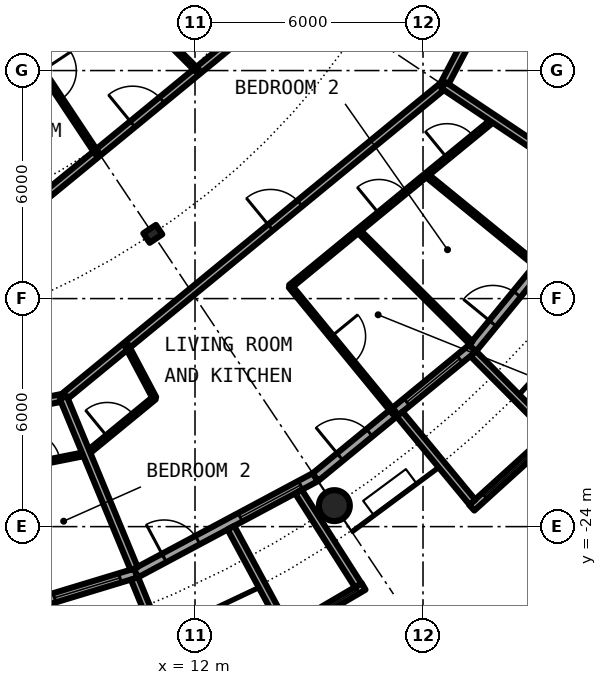
"""IFC4 building model, lengths in metres.
Left out: names, types, materials, properties, quantities, classifications, styles, units other than length and angle.
Written with IfcOpenShell. Run it as: python <this file> out.ifc"""

import sys

from ifc_helpers import new_model, si_unit, direction, frame, frame_2d, origin, origin_2d, place, context, subcontext, project, spatial, rectangle, circle, hollow_circle, i_section, extrude, element, fill, save


model = new_model("IFC4")
c1 = context("Model", 3, precision=1e-05, world=origin(), true_north=direction((0.0, 1.0)))
c2 = subcontext(c1, "Body", "Model", "MODEL_VIEW")
j1 = project(units=[si_unit("LENGTHUNIT", "METRE"), si_unit("PLANEANGLEUNIT", "RADIAN")], contexts=[c1])
p1 = place(None, origin())
s1 = spatial("IfcSite", under=j1, at=p1, CompositionType="ELEMENT")
p2 = place(p1, origin())
s2 = spatial("IfcBuilding", under=s1, at=p2, CompositionType="ELEMENT")
p3 = place(p2, frame((0.0, 0.0, 196.3)))
s3 = spatial("IfcBuildingStorey", under=s2, at=p3, CompositionType="ELEMENT", Elevation=196.3)
p4 = place(p3, frame((15.667, -23.448, 0.0), z_axis=(0.0, 0.0, 1.0), x_axis=(1.0, 0.0, 0.0)))
e1 = element("IfcColumn", 1, at=p4, inside=s3, PredefinedType="COLUMN", context=c2, shape_type="SweptSolid", body=[
    extrude(hollow_circle(Radius=0.406, WallThickness=0.03, at=origin_2d()), origin(), (0.0, 0.0, 1.0), 3.05),
])
p5 = place(p3, frame((10.889, -16.297, 0.0), z_axis=(0.0, 0.0, 1.0), x_axis=(0.55557023302, -0.831469612303, 0.0)))
e2 = element("IfcColumn", 2, at=p5, inside=s3, PredefinedType="COLUMN", context=c2, shape_type="SweptSolid", body=[
    extrude(i_section(OverallWidth=0.3, OverallDepth=0.4, WebThickness=0.013, FlangeThickness=0.024, FilletRadius=0.027, at=origin_2d()), origin(), (0.0, 0.0, 1.0), 3.05),
])
p6 = place(p3, frame((5.326, -26.775, 0.0), z_axis=(0.0, 0.0, 1.0), x_axis=(0.956965678721, 0.290201119486, 0.0)))
e3 = element("IfcWall", 3, at=p6, inside=s3, PredefinedType="SOLIDWALL", context=c2, shape_type="SweptSolid", body=[
    extrude(rectangle(XDim=5.351, YDim=0.25, at=frame_2d((2.676, 0.0))), origin(), (0.0, 0.0, 1.0), 2.7),
])
p7 = place(p6, frame((0.841, 0.0, 0.0)))
e4 = element("IfcOpeningElement", 4, at=p7, cuts=e3, PredefinedType="OPENING", context=c2, shape_type="SweptSolid", body=[
    extrude(rectangle(XDim=1.0, YDim=2.2, at=frame_2d((0.5, 1.1))), frame((0.0, 0.135, 0.0), z_axis=(0.0, -1.0, 0.0), x_axis=(1.0, 0.0, 0.0)), (0.0, 0.0, 1.0), 0.27),
])
p8 = place(p6, frame((3.111, 0.0, 0.3)))
e5 = element("IfcOpeningElement", 5, at=p8, cuts=e3, PredefinedType="OPENING", context=c2, shape_type="SweptSolid", body=[
    extrude(rectangle(XDim=1.8, YDim=2.1, at=frame_2d((0.9, 1.05))), frame((0.0, 0.135, 0.0), z_axis=(0.0, -1.0, 0.0), x_axis=(1.0, 0.0, 0.0)), (0.0, 0.0, 1.0), 0.27),
])
p9 = place(p3, frame((8.009, -26.092, -0.03), z_axis=(0.0, 0.0, 1.0), x_axis=(0.293406695073, -0.955987715029, 0.0)))
e6 = element("IfcWall", 6, at=p9, inside=s3, PredefinedType="SOLIDWALL", context=c2, shape_type="SweptSolid", body=[
    extrude(rectangle(XDim=3.006, YDim=0.2, at=frame_2d((1.503, 0.0))), origin(), (0.0, 0.0, 1.0), 2.73),
])
p10 = place(p3, frame((10.409, -25.364, -0.03), z_axis=(0.0, 0.0, 1.0), x_axis=(0.379509886562, -0.925187681501, 0.0)))
e7 = element("IfcWall", 7, at=p10, inside=s3, PredefinedType="SOLIDWALL", context=c2, shape_type="SweptSolid", body=[
    extrude(rectangle(XDim=2.883, YDim=0.2, at=frame_2d((1.441, 0.0))), origin(), (0.0, 0.0, 1.0), 2.73),
])
p11 = place(p3, frame((10.447, -25.222, 0.0), z_axis=(0.0, 0.0, 1.0), x_axis=(0.881915646801, 0.471407246368, 0.0)))
e8 = element("IfcWall", 8, at=p11, inside=s3, PredefinedType="SOLIDWALL", context=c2, shape_type="SweptSolid", body=[
    extrude(rectangle(XDim=5.352, YDim=0.25, at=frame_2d((2.676, 0.0))), origin(), (0.0, 0.0, 1.0), 2.7),
])
p12 = place(p11, frame((0.841, 0.0, 0.0)))
e9 = element("IfcOpeningElement", 9, at=p12, cuts=e8, PredefinedType="OPENING", context=c2, shape_type="SweptSolid", body=[
    extrude(rectangle(XDim=1.0, YDim=2.2, at=frame_2d((0.5, 1.1))), frame((0.0, 0.135, 0.0), z_axis=(0.0, -1.0, 0.0), x_axis=(1.0, 0.0, 0.0)), (0.0, 0.0, 1.0), 0.27),
])
p13 = place(p11, frame((3.111, 0.0, 0.3)))
e10 = element("IfcOpeningElement", 10, at=p13, cuts=e8, PredefinedType="OPENING", context=c2, shape_type="SweptSolid", body=[
    extrude(rectangle(XDim=1.8, YDim=2.1, at=frame_2d((0.9, 1.05))), frame((0.0, 0.135, 0.0), z_axis=(0.0, -1.0, 0.0), x_axis=(1.0, 0.0, 0.0)), (0.0, 0.0, 1.0), 0.27),
])
p14 = place(p3, frame((14.327, -26.812, -0.03), z_axis=(0.0, 0.0, 1.0), x_axis=(0.862403467503, 0.506221551535, 0.0)))
e11 = element("IfcWall", 11, at=p14, inside=s3, PredefinedType="SOLIDWALL", context=c2, shape_type="SweptSolid", body=[
    extrude(rectangle(XDim=2.446, YDim=0.2, at=frame_2d((1.223, 0.0))), origin(), (0.0, 0.0, 1.0), 2.73),
])
p15 = place(p14, frame((0.183, 0.0, 0.33)))
e12 = element("IfcOpeningElement", 12, at=p15, cuts=e11, PredefinedType="OPENING", context=c2, shape_type="SweptSolid", body=[
    extrude(circle(Radius=1.04, at=frame_2d((1.04, 1.04))), frame((0.0, 0.11, 0.0), z_axis=(0.0, -1.0, 0.0), x_axis=(1.0, 0.0, 0.0)), (0.0, 0.0, 1.0), 0.22),
])
p16 = place(p3, frame((12.945, -24.029, -0.03), z_axis=(0.0, 0.0, 1.0), x_axis=(0.474424310775, -0.88029629861, 0.0)))
e13 = element("IfcWall", 13, at=p16, inside=s3, PredefinedType="SOLIDWALL", context=c2, shape_type="SweptSolid", body=[
    extrude(rectangle(XDim=3.006, YDim=0.2, at=frame_2d((1.503, 0.0))), origin(), (0.0, 0.0, 1.0), 2.73),
])
p17 = place(p3, frame((14.722, -23.079, -0.03), z_axis=(0.0, 0.0, 1.0), x_axis=(0.537572179146, -0.843217737129, 0.0)))
e14 = element("IfcWall", 14, at=p17, inside=s3, PredefinedType="SOLIDWALL", context=c2, shape_type="SweptSolid", body=[
    extrude(rectangle(XDim=2.924, YDim=0.2, at=frame_2d((1.462, 0.0))), origin(), (0.0, 0.0, 1.0), 2.73),
])
p18 = place(p3, frame((15.167, -22.699, 0.0), z_axis=(0.0, 0.0, 1.0), x_axis=(0.773019449054, 0.634382322723, 0.0)))
e15 = element("IfcWall", 15, at=p18, inside=s3, PredefinedType="SOLIDWALL", context=c2, shape_type="SweptSolid", body=[
    extrude(rectangle(XDim=5.352, YDim=0.25, at=frame_2d((2.676, 0.0))), origin(), (0.0, 0.0, 1.0), 2.7),
])
p19 = place(p18, frame((0.841, 0.0, 0.0)))
e16 = element("IfcOpeningElement", 16, at=p19, cuts=e15, PredefinedType="OPENING", context=c2, shape_type="SweptSolid", body=[
    extrude(rectangle(XDim=1.0, YDim=2.2, at=frame_2d((0.5, 1.1))), frame((0.0, 0.135, 0.0), z_axis=(0.0, -1.0, 0.0), x_axis=(1.0, 0.0, 0.0)), (0.0, 0.0, 1.0), 0.27),
])
p20 = place(p18, frame((3.111, 0.0, 0.3)))
e17 = element("IfcOpeningElement", 17, at=p20, cuts=e15, PredefinedType="OPENING", context=c2, shape_type="SweptSolid", body=[
    extrude(rectangle(XDim=1.8, YDim=2.1, at=frame_2d((0.9, 1.05))), frame((0.0, 0.135, 0.0), z_axis=(0.0, -1.0, 0.0), x_axis=(1.0, 0.0, 0.0)), (0.0, 0.0, 1.0), 0.27),
])
p21 = place(p3, frame((19.282, -23.503, -0.03), z_axis=(0.0, 0.0, 1.0), x_axis=(0.740998365753, 0.671506829416, 0.0)))
e18 = element("IfcWall", 18, at=p21, inside=s3, PredefinedType="SOLIDWALL", context=c2, shape_type="SweptSolid", body=[
    extrude(rectangle(XDim=2.993, YDim=0.2, at=frame_2d((1.497, 0.0))), origin(), (0.0, 0.0, 1.0), 2.73),
])
p22 = place(p21, frame((0.457, 0.0, 0.33)))
e19 = element("IfcOpeningElement", 19, at=p22, cuts=e18, PredefinedType="OPENING", context=c2, shape_type="SweptSolid", body=[
    extrude(circle(Radius=1.04, at=frame_2d((1.04, 1.04))), frame((0.0, 0.11, 0.0), z_axis=(0.0, -1.0, 0.0), x_axis=(1.0, 0.0, 0.0)), (0.0, 0.0, 1.0), 0.22),
])
p23 = place(p3, frame((17.384, -21.041, -0.03), z_axis=(0.0, 0.0, 1.0), x_axis=(0.63709551667, -0.770784861449, 0.0)))
e20 = element("IfcWall", 20, at=p23, inside=s3, PredefinedType="SOLIDWALL", context=c2, shape_type="SweptSolid", body=[
    extrude(rectangle(XDim=3.006, YDim=0.2, at=frame_2d((1.503, 0.0))), origin(), (0.0, 0.0, 1.0), 2.73),
])
p24 = place(p3, frame((19.323, -19.45, -0.03), z_axis=(0.0, 0.0, 1.0), x_axis=(0.704476739375, -0.709727076896, 0.0)))
e21 = element("IfcWall", 21, at=p24, inside=s3, PredefinedType="SOLIDWALL", context=c2, shape_type="SweptSolid", body=[
    extrude(rectangle(XDim=2.883, YDim=0.2, at=frame_2d((1.441, 0.0))), origin(), (0.0, 0.0, 1.0), 2.73),
])
p25 = place(p3, frame((19.304, -19.304, 0.0), z_axis=(0.0, 0.0, 1.0), x_axis=(0.634382322723, 0.773019449054, 0.0)))
e22 = element("IfcWall", 22, at=p25, inside=s3, PredefinedType="SOLIDWALL", context=c2, shape_type="SweptSolid", body=[
    extrude(rectangle(XDim=5.352, YDim=0.25, at=frame_2d((2.676, 0.0))), origin(), (0.0, 0.0, 1.0), 2.7),
])
p26 = place(p25, frame((0.841, 0.0, 0.0)))
e23 = element("IfcOpeningElement", 23, at=p26, cuts=e22, PredefinedType="OPENING", context=c2, shape_type="SweptSolid", body=[
    extrude(rectangle(XDim=1.0, YDim=2.2, at=frame_2d((0.5, 1.1))), frame((0.0, 0.135, 0.0), z_axis=(0.0, -1.0, 0.0), x_axis=(1.0, 0.0, 0.0)), (0.0, 0.0, 1.0), 0.27),
])
p27 = place(p25, frame((3.111, 0.0, 0.3)))
e24 = element("IfcOpeningElement", 24, at=p27, cuts=e22, PredefinedType="OPENING", context=c2, shape_type="SweptSolid", body=[
    extrude(rectangle(XDim=1.8, YDim=2.1, at=frame_2d((0.9, 1.05))), frame((0.0, 0.135, 0.0), z_axis=(0.0, -1.0, 0.0), x_axis=(1.0, 0.0, 0.0)), (0.0, 0.0, 1.0), 0.27),
])
p28 = place(p3, frame((4.577, -22.989, 0.0), z_axis=(0.0, 0.0, 1.0), x_axis=(0.980813600024, 0.194947895622, 0.0)))
e25 = element("IfcWall", 25, at=p28, inside=s3, PredefinedType="PARTITIONING", context=c2, shape_type="SweptSolid", body=[
    extrude(rectangle(XDim=4.662, YDim=0.1, at=frame_2d((2.331, 0.0))), origin(), (0.0, 0.0, 1.0), 2.7),
])
p29 = place(p28, frame((3.043, 0.0, 0.0)))
e26 = element("IfcOpeningElement", 26, at=p29, cuts=e25, PredefinedType="OPENING", context=c2, shape_type="SweptSolid", body=[
    extrude(rectangle(XDim=0.9, YDim=2.3, at=frame_2d((0.45, 1.15))), frame((0.0, 0.06, 0.0), z_axis=(0.0, -1.0, 0.0), x_axis=(1.0, 0.0, 0.0)), (0.0, 0.0, 1.0), 0.12),
])
p30 = place(p3, frame((9.146, -22.081, 0.0), z_axis=(0.0, 0.0, 1.0), x_axis=(0.773095932958, 0.634289112663, 0.0)))
e27 = element("IfcWall", 27, at=p30, inside=s3, PredefinedType="PARTITIONING", context=c2, shape_type="SweptSolid", body=[
    extrude(rectangle(XDim=2.313, YDim=0.1, at=frame_2d((1.156, 0.0))), origin(), (0.0, 0.0, 1.0), 2.7),
])
p31 = place(p30, frame((0.706, 0.0, 0.0)))
e28 = element("IfcOpeningElement", 28, at=p31, cuts=e27, PredefinedType="OPENING", context=c2, shape_type="SweptSolid", body=[
    extrude(rectangle(XDim=0.9, YDim=2.3, at=frame_2d((0.45, 1.15))), frame((0.0, 0.06, 0.0), z_axis=(0.0, -1.0, 0.0), x_axis=(1.0, 0.0, 0.0)), (0.0, 0.0, 1.0), 0.12),
])
p32 = place(p3, frame((14.508, -17.681, 0.0), z_axis=(0.0, 0.0, 1.0), x_axis=(0.773155647559, 0.634216323227, 0.0)))
e29 = element("IfcWall", 29, at=p32, inside=s3, PredefinedType="PARTITIONING", context=c2, shape_type="SweptSolid", body=[
    extrude(rectangle(XDim=6.939, YDim=0.1, at=frame_2d((3.469, 0.0))), origin(), (0.0, 0.0, 1.0), 2.7),
])
p33 = place(p32, frame((3.019, 0.0, 0.0)))
e30 = element("IfcOpeningElement", 30, at=p33, cuts=e29, PredefinedType="OPENING", context=c2, shape_type="SweptSolid", body=[
    extrude(rectangle(XDim=0.9, YDim=2.3, at=frame_2d((0.45, 1.15))), frame((0.0, 0.06, 0.0), z_axis=(0.0, -1.0, 0.0), x_axis=(1.0, 0.0, 0.0)), (0.0, 0.0, 1.0), 0.12),
])
p34 = place(p32, frame((5.334, 0.0, 0.0)))
e31 = element("IfcOpeningElement", 31, at=p34, cuts=e29, PredefinedType="OPENING", context=c2, shape_type="SweptSolid", body=[
    extrude(rectangle(XDim=0.9, YDim=2.3, at=frame_2d((0.45, 1.15))), frame((0.0, 0.06, 0.0), z_axis=(0.0, -1.0, 0.0), x_axis=(1.0, 0.0, 0.0)), (0.0, 0.0, 1.0), 0.12),
])
p35 = place(p3, frame((18.542, -12.389, 0.0), z_axis=(0.0, 0.0, 1.0), x_axis=(0.465359652486, 0.885121683068, 0.0)))
e32 = element("IfcWall", 32, at=p35, inside=s3, PredefinedType="PARTITIONING", context=c2, shape_type="SweptSolid", body=[
    extrude(rectangle(XDim=1.665, YDim=0.2, at=frame_2d((0.833, 0.0))), origin(), (0.0, 0.0, 1.0), 2.7),
])
p36 = place(p3, frame((0.0, -22.3, 0.0), z_axis=(0.0, 0.0, 1.0), x_axis=(0.980813117615, 0.194950322682, 0.0)))
e33 = element("IfcWall", 33, at=p36, inside=s3, PredefinedType="PARTITIONING", context=c2, shape_type="SweptSolid", body=[
    extrude(rectangle(XDim=8.7, YDim=0.2, at=frame_2d((4.35, 0.0))), origin(), (0.0, 0.0, 1.0), 2.7),
])
p37 = place(p36, frame((4.938, 0.0, 0.0)))
e34 = element("IfcOpeningElement", 34, at=p37, cuts=e33, PredefinedType="OPENING", context=c2, shape_type="SweptSolid", body=[
    extrude(rectangle(XDim=1.0, YDim=2.3, at=frame_2d((0.5, 1.15))), frame((0.0, 0.11, 0.0), z_axis=(0.0, -1.0, 0.0), x_axis=(1.0, 0.0, 0.0)), (0.0, 0.0, 1.0), 0.22),
])
p38 = place(p3, frame((8.534, -20.603, 0.0), z_axis=(0.0, 0.0, 1.0), x_axis=(0.772983503654, 0.634426121056, 0.0)))
e35 = element("IfcWall", 35, at=p38, inside=s3, PredefinedType="PARTITIONING", context=c2, shape_type="SweptSolid", body=[
    extrude(rectangle(XDim=12.947, YDim=0.2, at=frame_2d((6.474, 0.0))), origin(), (0.0, 0.0, 1.0), 2.7),
])
p39 = place(p38, frame((7.053, 0.0, 0.0)))
e36 = element("IfcOpeningElement", 36, at=p39, cuts=e35, PredefinedType="OPENING", context=c2, shape_type="SweptSolid", body=[
    extrude(rectangle(XDim=1.0, YDim=2.3, at=frame_2d((0.5, 1.15))), frame((0.0, 0.11, 0.0), z_axis=(0.0, -1.0, 0.0), x_axis=(1.0, 0.0, 0.0)), (0.0, 0.0, 1.0), 0.22),
])
p40 = place(p3, frame((6.773, -16.353, 0.0), z_axis=(0.0, 0.0, 1.0), x_axis=(0.773034536097, 0.634363938131, 0.0)))
e37 = element("IfcWall", 37, at=p40, inside=s3, PredefinedType="PARTITIONING", context=c2, shape_type="SweptSolid", body=[
    extrude(rectangle(XDim=10.277, YDim=0.2, at=frame_2d((5.138, 0.0))), origin(), (0.0, 0.0, 1.0), 2.7),
])
p41 = place(p40, frame((4.638, 0.0, 0.0)))
e38 = element("IfcOpeningElement", 38, at=p41, cuts=e37, PredefinedType="OPENING", context=c2, shape_type="SweptSolid", body=[
    extrude(rectangle(XDim=1.0, YDim=2.3, at=frame_2d((0.5, 1.15))), frame((0.0, 0.11, 0.0), z_axis=(0.0, -1.0, 0.0), x_axis=(1.0, 0.0, 0.0)), (0.0, 0.0, 1.0), 0.22),
])
p42 = place(p3, frame((7.031, -10.582, 0.0), z_axis=(0.0, 0.0, 1.0), x_axis=(0.553303732327, -0.832979579457, 0.0)))
e39 = element("IfcWall", 39, at=p42, inside=s3, PredefinedType="PARTITIONING", context=c2, shape_type="SweptSolid", body=[
    extrude(rectangle(XDim=4.319, YDim=0.1, at=frame_2d((2.16, 0.0))), origin(), (0.0, 0.0, 1.0), 2.7),
])
p43 = place(p42, frame((1.71, 0.0, 0.0)))
e40 = element("IfcOpeningElement", 40, at=p43, cuts=e39, PredefinedType="OPENING", context=c2, shape_type="SweptSolid", body=[
    extrude(rectangle(XDim=0.9, YDim=2.3, at=frame_2d((0.45, 1.15))), frame((0.0, 0.06, 0.0), z_axis=(0.0, -1.0, 0.0), x_axis=(1.0, 0.0, 0.0)), (0.0, 0.0, 1.0), 0.12),
])
p44 = place(p3, frame((8.534, -20.603, 0.0), z_axis=(0.0, 0.0, 1.0), x_axis=(0.382651153718, -0.923892902104, 0.0)))
e41 = element("IfcWall", 41, at=p44, inside=s3, PredefinedType="PARTITIONING", context=c2, shape_type="SweptSolid", body=[
    extrude(rectangle(XDim=4.874, YDim=0.2, at=frame_2d((2.437, 0.0))), origin(), (0.0, 0.0, 1.0), 2.7),
])
p45 = place(p3, frame((9.097, -9.05, 0.0), z_axis=(0.0, 0.0, 1.0), x_axis=(0.708909651863, -0.705299302067, 0.0)))
e42 = element("IfcWall", 42, at=p45, inside=s3, PredefinedType="PARTITIONING", context=c2, shape_type="SweptSolid", body=[
    extrude(rectangle(XDim=4.193, YDim=0.1, at=frame_2d((2.096, 0.0))), origin(), (0.0, 0.0, 1.0), 2.7),
])
p46 = place(p45, frame((1.646, 0.0, 0.0)))
e43 = element("IfcOpeningElement", 43, at=p46, cuts=e42, PredefinedType="OPENING", context=c2, shape_type="SweptSolid", body=[
    extrude(rectangle(XDim=0.9, YDim=2.3, at=frame_2d((0.45, 1.15))), frame((0.0, 0.06, 0.0), z_axis=(0.0, -1.0, 0.0), x_axis=(1.0, 0.0, 0.0)), (0.0, 0.0, 1.0), 0.12),
])
p47 = place(p3, frame((10.202, -19.234, 0.0), z_axis=(0.0, 0.0, 1.0), x_axis=(0.468648615763, -0.88338466986, 0.0)))
e44 = element("IfcWall", 44, at=p47, inside=s3, PredefinedType="PARTITIONING", context=c2, shape_type="SweptSolid", body=[
    extrude(rectangle(XDim=1.562, YDim=0.1, at=frame_2d((0.781, 0.0))), origin(), (0.0, 0.0, 1.0), 2.7),
])
p48 = place(p3, frame((14.509, -17.679, 0.0), z_axis=(0.0, 0.0, 1.0), x_axis=(0.634342681687, -0.77305197897, 0.0)))
e45 = element("IfcWall", 45, at=p48, inside=s3, PredefinedType="PARTITIONING", context=c2, shape_type="SweptSolid", body=[
    extrude(rectangle(XDim=4.305, YDim=0.1, at=frame_2d((2.153, 0.0))), origin(), (0.0, 0.0, 1.0), 2.7),
])
p49 = place(p48, frame((1.703, 0.0, 0.0)))
e46 = element("IfcOpeningElement", 46, at=p49, cuts=e45, PredefinedType="OPENING", context=c2, shape_type="SweptSolid", body=[
    extrude(rectangle(XDim=0.9, YDim=2.3, at=frame_2d((0.45, 1.15))), frame((0.0, 0.06, 0.0), z_axis=(0.0, -1.0, 0.0), x_axis=(1.0, 0.0, 0.0)), (0.0, 0.0, 1.0), 0.12),
])
p50 = place(p3, frame((16.296, -16.213, 0.0), z_axis=(0.0, 0.0, 1.0), x_axis=(0.708999026534, -0.705209458511, 0.0)))
e47 = element("IfcWall", 47, at=p50, inside=s3, PredefinedType="PARTITIONING", context=c2, shape_type="SweptSolid", body=[
    extrude(rectangle(XDim=4.188, YDim=0.1, at=frame_2d((2.094, 0.0))), origin(), (0.0, 0.0, 1.0), 2.7),
])
p51 = place(p3, frame((18.084, -14.745, 0.0), z_axis=(0.0, 0.0, 1.0), x_axis=(0.77495020745, -0.632022290724, 0.0)))
e48 = element("IfcWall", 48, at=p51, inside=s3, PredefinedType="PARTITIONING", context=c2, shape_type="SweptSolid", body=[
    extrude(rectangle(XDim=3.842, YDim=0.1, at=frame_2d((1.921, 0.0))), origin(), (0.0, 0.0, 1.0), 2.7),
])
p52 = place(p3, frame((18.542, -12.389, 0.0), z_axis=(0.0, 0.0, 1.0), x_axis=(0.831387096605, -0.55569370664, 0.0)))
e49 = element("IfcWall", 49, at=p52, inside=s3, PredefinedType="PARTITIONING", context=c2, shape_type="SweptSolid", body=[
    extrude(rectangle(XDim=4.875, YDim=0.2, at=frame_2d((2.438, 0.0))), origin(), (0.0, 0.0, 1.0), 2.7),
])
p53 = place(p8, origin())
e50 = element("IfcWindow", 50, at=p53, inside=s3, PartitioningType="SINGLE_PANEL", PredefinedType="WINDOW", context=c2, shape_type="SweptSolid", body=[
    extrude(rectangle(XDim=1.8, YDim=2.1, at=frame_2d((0.9, 1.05))), frame((0.0, 0.03, 0.0), z_axis=(0.0, -1.0, 0.0), x_axis=(1.0, 0.0, 0.0)), (0.0, 0.0, 1.0), 0.06),
])
fill(e5, e50)
p54 = place(p12, origin())
e51 = element("IfcDoor", 51, at=p54, inside=s3, OperationType="SINGLE_SWING_LEFT", PredefinedType="DOOR", context=c2, shape_type="SweptSolid", body=[
    extrude(rectangle(XDim=1.0, YDim=2.2, at=frame_2d((0.5, 1.1))), frame((0.0, 0.025, 0.0), z_axis=(0.0, -1.0, 0.0), x_axis=(1.0, 0.0, 0.0)), (0.0, 0.0, 1.0), 0.05),
])
fill(e9, e51)
p55 = place(p13, origin())
e52 = element("IfcWindow", 52, at=p55, inside=s3, PartitioningType="SINGLE_PANEL", PredefinedType="WINDOW", context=c2, shape_type="SweptSolid", body=[
    extrude(rectangle(XDim=1.8, YDim=2.1, at=frame_2d((0.9, 1.05))), frame((0.0, 0.03, 0.0), z_axis=(0.0, -1.0, 0.0), x_axis=(1.0, 0.0, 0.0)), (0.0, 0.0, 1.0), 0.06),
])
fill(e10, e52)
p56 = place(p15, origin())
e53 = element("IfcWindow", 53, at=p56, inside=s3, PartitioningType="SINGLE_PANEL", PredefinedType="WINDOW", context=c2, shape_type="SweptSolid", body=[
    extrude(circle(Radius=1.04, at=frame_2d((1.04, 1.04))), frame((0.0, 0.03, 0.0), z_axis=(0.0, -1.0, 0.0), x_axis=(1.0, 0.0, 0.0)), (0.0, 0.0, 1.0), 0.06),
])
fill(e12, e53)
p57 = place(p19, origin())
e54 = element("IfcDoor", 54, at=p57, inside=s3, OperationType="SINGLE_SWING_LEFT", PredefinedType="DOOR", context=c2, shape_type="SweptSolid", body=[
    extrude(rectangle(XDim=1.0, YDim=2.2, at=frame_2d((0.5, 1.1))), frame((0.0, 0.025, 0.0), z_axis=(0.0, -1.0, 0.0), x_axis=(1.0, 0.0, 0.0)), (0.0, 0.0, 1.0), 0.05),
])
fill(e16, e54)
p58 = place(p20, origin())
e55 = element("IfcWindow", 55, at=p58, inside=s3, PartitioningType="SINGLE_PANEL", PredefinedType="WINDOW", context=c2, shape_type="SweptSolid", body=[
    extrude(rectangle(XDim=1.8, YDim=2.1, at=frame_2d((0.9, 1.05))), frame((0.0, 0.03, 0.0), z_axis=(0.0, -1.0, 0.0), x_axis=(1.0, 0.0, 0.0)), (0.0, 0.0, 1.0), 0.06),
])
fill(e17, e55)
p59 = place(p22, origin())
e56 = element("IfcWindow", 56, at=p59, inside=s3, PartitioningType="SINGLE_PANEL", PredefinedType="WINDOW", context=c2, shape_type="SweptSolid", body=[
    extrude(circle(Radius=1.04, at=frame_2d((1.04, 1.04))), frame((0.0, 0.03, 0.0), z_axis=(0.0, -1.0, 0.0), x_axis=(1.0, 0.0, 0.0)), (0.0, 0.0, 1.0), 0.06),
])
fill(e19, e56)
p60 = place(p26, origin())
e57 = element("IfcDoor", 57, at=p60, inside=s3, OperationType="SINGLE_SWING_LEFT", PredefinedType="DOOR", context=c2, shape_type="SweptSolid", body=[
    extrude(rectangle(XDim=1.0, YDim=2.2, at=frame_2d((0.5, 1.1))), frame((0.0, 0.025, 0.0), z_axis=(0.0, -1.0, 0.0), x_axis=(1.0, 0.0, 0.0)), (0.0, 0.0, 1.0), 0.05),
])
fill(e23, e57)
p61 = place(p29, origin())
e58 = element("IfcDoor", 58, at=p61, inside=s3, OperationType="SINGLE_SWING_RIGHT", PredefinedType="DOOR", context=c2, shape_type="SweptSolid", body=[
    extrude(rectangle(XDim=0.9, YDim=2.3, at=frame_2d((0.45, 1.15))), frame((0.0, 0.025, 0.0), z_axis=(0.0, -1.0, 0.0), x_axis=(1.0, 0.0, 0.0)), (0.0, 0.0, 1.0), 0.05),
])
fill(e26, e58)
p62 = place(p39, origin())
e59 = element("IfcDoor", 59, at=p62, inside=s3, OperationType="SINGLE_SWING_RIGHT", PredefinedType="DOOR", context=c2, shape_type="SweptSolid", body=[
    extrude(rectangle(XDim=1.0, YDim=2.3, at=frame_2d((0.5, 1.15))), frame((0.0, 0.025, 0.0), z_axis=(0.0, -1.0, 0.0), x_axis=(1.0, 0.0, 0.0)), (0.0, 0.0, 1.0), 0.05),
])
fill(e36, e59)
p63 = place(p31, origin())
e60 = element("IfcDoor", 60, at=p63, inside=s3, OperationType="SINGLE_SWING_LEFT", PredefinedType="DOOR", context=c2, shape_type="SweptSolid", body=[
    extrude(rectangle(XDim=0.9, YDim=2.3, at=frame_2d((0.45, 1.15))), frame((0.0, 0.025, 0.0), z_axis=(0.0, -1.0, 0.0), x_axis=(1.0, 0.0, 0.0)), (0.0, 0.0, 1.0), 0.05),
])
fill(e28, e60)
p64 = place(p49, origin())
e61 = element("IfcDoor", 61, at=p64, inside=s3, OperationType="SINGLE_SWING_RIGHT", PredefinedType="DOOR", context=c2, shape_type="SweptSolid", body=[
    extrude(rectangle(XDim=0.9, YDim=2.3, at=frame_2d((0.45, 1.15))), frame((0.0, 0.025, 0.0), z_axis=(0.0, -1.0, 0.0), x_axis=(1.0, 0.0, 0.0)), (0.0, 0.0, 1.0), 0.05),
])
fill(e46, e61)
p65 = place(p33, origin())
e62 = element("IfcDoor", 62, at=p65, inside=s3, OperationType="SINGLE_SWING_LEFT", PredefinedType="DOOR", context=c2, shape_type="SweptSolid", body=[
    extrude(rectangle(XDim=0.9, YDim=2.3, at=frame_2d((0.45, 1.15))), frame((0.0, 0.025, 0.0), z_axis=(0.0, -1.0, 0.0), x_axis=(1.0, 0.0, 0.0)), (0.0, 0.0, 1.0), 0.05),
])
fill(e30, e62)
p66 = place(p34, origin())
e63 = element("IfcDoor", 63, at=p66, inside=s3, OperationType="SINGLE_SWING_RIGHT", PredefinedType="DOOR", context=c2, shape_type="SweptSolid", body=[
    extrude(rectangle(XDim=0.9, YDim=2.3, at=frame_2d((0.45, 1.15))), frame((0.0, 0.025, 0.0), z_axis=(0.0, -1.0, 0.0), x_axis=(1.0, 0.0, 0.0)), (0.0, 0.0, 1.0), 0.05),
])
fill(e31, e63)
p67 = place(p41, origin())
e64 = element("IfcDoor", 64, at=p67, inside=s3, OperationType="SINGLE_SWING_RIGHT", PredefinedType="DOOR", context=c2, shape_type="SweptSolid", body=[
    extrude(rectangle(XDim=1.0, YDim=2.3, at=frame_2d((0.5, 1.15))), frame((0.0, 0.025, 0.0), z_axis=(0.0, -1.0, 0.0), x_axis=(1.0, 0.0, 0.0)), (0.0, 0.0, 1.0), 0.05),
])
fill(e38, e64)
p68 = place(p43, origin())
e65 = element("IfcDoor", 65, at=p68, inside=s3, OperationType="SINGLE_SWING_RIGHT", PredefinedType="DOOR", context=c2, shape_type="SweptSolid", body=[
    extrude(rectangle(XDim=0.9, YDim=2.3, at=frame_2d((0.45, 1.15))), frame((0.0, 0.025, 0.0), z_axis=(0.0, -1.0, 0.0), x_axis=(1.0, 0.0, 0.0)), (0.0, 0.0, 1.0), 0.05),
])
fill(e40, e65)
save(model, sys.argv[1])
